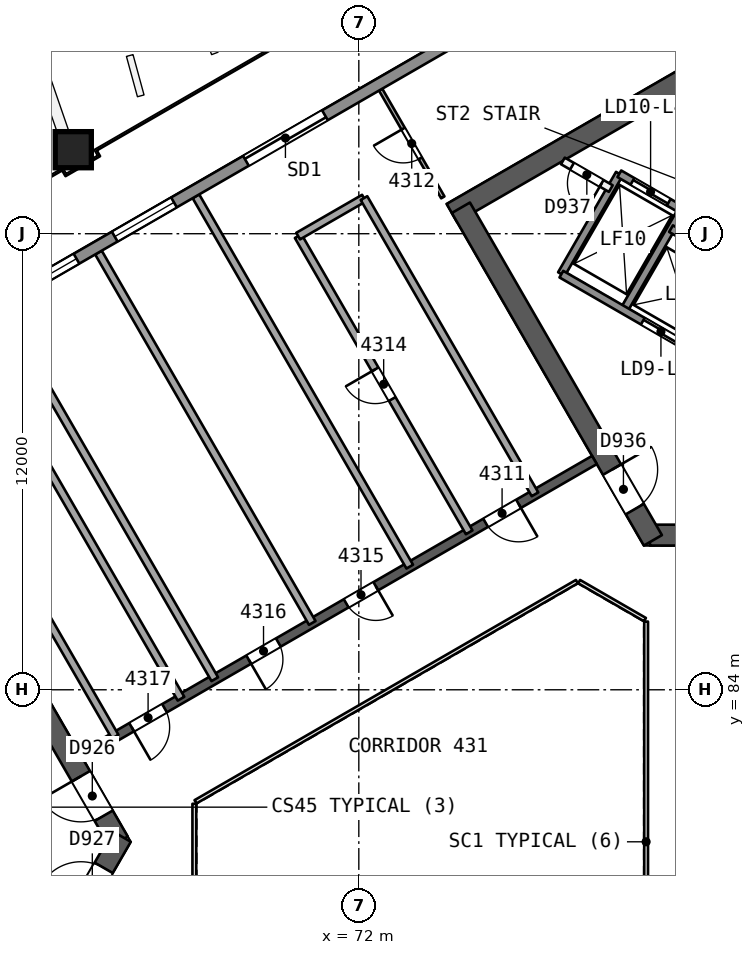
"""IFC4 building model, lengths in metres.
Left out: names, types, materials, properties, quantities, classifications, styles, units other than length and angle.
Written with IfcOpenShell. Run it as: python <this file> out.ifc"""

import sys

from ifc_helpers import new_model, si_unit, direction, frame, frame_2d, origin, origin_2d, place, context, subcontext, project, spatial, rectangle, extrude, element, fill, save


model = new_model("IFC4")
c1 = context("Model", 3, precision=1e-05, world=origin(), true_north=direction((0.0, 1.0)))
c2 = subcontext(c1, "Body", "Model", "MODEL_VIEW")
j1 = project(units=[si_unit("LENGTHUNIT", "METRE"), si_unit("PLANEANGLEUNIT", "RADIAN")], contexts=[c1])
p1 = place(None, origin())
s1 = spatial("IfcSite", under=j1, at=p1, CompositionType="ELEMENT")
p2 = place(p1, origin())
s2 = spatial("IfcBuilding", under=s1, at=p2, CompositionType="ELEMENT")
p3 = place(p2, frame((0.0, 0.0, 178.5)))
s3 = spatial("IfcBuildingStorey", under=s2, at=p3, CompositionType="ELEMENT", Elevation=178.5)
p4 = place(p3, frame((65.682, 80.0, 0.0), z_axis=(0.0, 0.0, 1.0), x_axis=(-0.500000202252, 0.866025287014, 0.0)))
e1 = element("IfcWall", 1, at=p4, inside=s3, PredefinedType="SHEAR", context=c2, shape_type="SweptSolid", body=[
    extrude(rectangle(XDim=10.221, YDim=0.55, at=frame_2d((5.111, 0.0))), origin(), (0.0, 0.0, 1.0), 3.7),
])
p5 = place(p4, frame((0.791, 0.0, 0.0)))
e2 = element("IfcOpeningElement", 2, at=p5, cuts=e1, PredefinedType="OPENING", context=c2, shape_type="SweptSolid", body=[
    extrude(rectangle(XDim=1.2, YDim=2.1, at=frame_2d((0.6, 1.05))), frame((0.0, 0.286, 0.0), z_axis=(0.0, -1.0, 0.0), x_axis=(1.0, 0.0, 0.0)), (0.0, 0.0, 1.0), 0.571),
])
p6 = place(p3, frame((60.709, 71.386, 0.0), z_axis=(0.0, 0.0, 1.0), x_axis=(0.500015938302, 0.866016201606, 0.0)))
e3 = element("IfcWall", 3, at=p6, inside=s3, PredefinedType="SHEAR", context=c2, shape_type="SweptSolid", body=[
    extrude(rectangle(XDim=10.105, YDim=0.55, at=frame_2d((5.053, 0.0))), origin(), (0.0, 0.0, 1.0), 3.7),
])
p7 = place(p6, frame((7.955, 0.0, 0.0)))
e4 = element("IfcOpeningElement", 4, at=p7, cuts=e3, PredefinedType="OPENING", context=c2, shape_type="SweptSolid", body=[
    extrude(rectangle(XDim=1.2, YDim=2.1, at=frame_2d((0.6, 1.05))), frame((0.0, 0.286, 0.0), z_axis=(0.0, -1.0, 0.0), x_axis=(1.0, 0.0, 0.0)), (0.0, 0.0, 1.0), 0.571),
])
p8 = place(p3, frame((79.659, 88.069, 0.0), z_axis=(0.0, 0.0, 1.0), x_axis=(1.0, 0.0, 0.0)))
e5 = element("IfcWall", 5, at=p8, inside=s3, PredefinedType="SHEAR", context=c2, shape_type="SweptSolid", body=[
    extrude(rectangle(XDim=10.221, YDim=0.55, at=frame_2d((5.111, 0.0))), origin(), (0.0, 0.0, 1.0), 3.7),
])
p9 = place(p8, frame((0.791, 0.0, 0.0)))
e6 = element("IfcOpeningElement", 6, at=p9, cuts=e5, PredefinedType="OPENING", context=c2, shape_type="SweptSolid", body=[
    extrude(rectangle(XDim=1.2, YDim=2.1, at=frame_2d((0.6, 1.05))), frame((0.0, 0.286, 0.0), z_axis=(0.0, -1.0, 0.0), x_axis=(1.0, 0.0, 0.0)), (0.0, 0.0, 1.0), 0.571),
])
p10 = place(p3, frame((86.723, 103.633, 0.0), z_axis=(0.0, 0.0, 1.0), x_axis=(-0.866023530946, -0.500003243837, 0.0)))
e7 = element("IfcWall", 7, at=p10, inside=s3, PredefinedType="SHEAR", context=c2, shape_type="SweptSolid", body=[
    extrude(rectangle(XDim=14.175, YDim=0.55, at=frame_2d((7.087, 0.0))), origin(), (0.0, 0.0, 1.0), 3.7),
])
p11 = place(p3, frame((74.686, 96.683, 0.0), z_axis=(0.0, 0.0, 1.0), x_axis=(0.499997818338, -0.866026663364, 0.0)))
e8 = element("IfcWall", 8, at=p11, inside=s3, PredefinedType="SHEAR", context=c2, shape_type="SweptSolid", body=[
    extrude(rectangle(XDim=10.105, YDim=0.55, at=frame_2d((5.052, 0.0))), origin(), (0.0, 0.0, 1.0), 3.7),
])
p12 = place(p11, frame((7.955, 0.0, 0.0)))
e9 = element("IfcOpeningElement", 9, at=p12, cuts=e8, PredefinedType="OPENING", context=c2, shape_type="SweptSolid", body=[
    extrude(rectangle(XDim=1.2, YDim=2.1, at=frame_2d((0.6, 1.05))), frame((0.0, 0.286, 0.0), z_axis=(0.0, -1.0, 0.0), x_axis=(1.0, 0.0, 0.0)), (0.0, 0.0, 1.0), 0.571),
])
p13 = place(p3, frame((78.2, 90.046, 0.0), z_axis=(0.0, 0.0, 1.0), x_axis=(-0.866026492143, -0.499998114903, 0.0)))
e10 = element("IfcWall", 10, at=p13, inside=s3, PredefinedType="SHEAR", context=c2, shape_type="SweptSolid", body=[
    extrude(rectangle(XDim=15.588, YDim=0.25, at=frame_2d((7.794, 0.0))), origin(), (0.0, 0.0, 1.0), 3.25),
])
p14 = place(p13, frame((2.306, 0.0, 0.0)))
e11 = element("IfcOpeningElement", 11, at=p14, cuts=e10, PredefinedType="OPENING", context=c2, shape_type="SweptSolid", body=[
    extrude(rectangle(XDim=1.0, YDim=2.1, at=frame_2d((0.5, 1.05))), frame((0.0, 0.135, 0.0), z_axis=(0.0, -1.0, 0.0), x_axis=(1.0, 0.0, 0.0)), (0.0, 0.0, 1.0), 0.271),
])
p15 = place(p13, frame((6.643, 0.0, 0.0)))
e12 = element("IfcOpeningElement", 12, at=p15, cuts=e10, PredefinedType="OPENING", context=c2, shape_type="SweptSolid", body=[
    extrude(rectangle(XDim=0.9, YDim=2.1, at=frame_2d((0.45, 1.05))), frame((0.0, 0.135, 0.0), z_axis=(0.0, -1.0, 0.0), x_axis=(1.0, 0.0, 0.0)), (0.0, 0.0, 1.0), 0.271),
])
p16 = place(p13, frame((9.604, 0.0, 0.0)))
e13 = element("IfcOpeningElement", 13, at=p16, cuts=e10, PredefinedType="OPENING", context=c2, shape_type="SweptSolid", body=[
    extrude(rectangle(XDim=0.9, YDim=2.1, at=frame_2d((0.45, 1.05))), frame((0.0, 0.135, 0.0), z_axis=(0.0, -1.0, 0.0), x_axis=(1.0, 0.0, 0.0)), (0.0, 0.0, 1.0), 0.271),
])
p17 = place(p13, frame((13.062, 0.0, 0.0)))
e14 = element("IfcOpeningElement", 14, at=p17, cuts=e10, PredefinedType="OPENING", context=c2, shape_type="SweptSolid", body=[
    extrude(rectangle(XDim=1.0, YDim=2.1, at=frame_2d((0.5, 1.05))), frame((0.0, 0.135, 0.0), z_axis=(0.0, -1.0, 0.0), x_axis=(1.0, 0.0, 0.0)), (0.0, 0.0, 1.0), 0.271),
])
p18 = place(p3, frame((64.474, 98.231, 0.0), z_axis=(0.010093620709, -0.017482414954, 0.999796221231), x_axis=(-0.499897086036, 0.865849517735, 0.020187025824)))
e15 = element("IfcColumn", 15, at=p18, inside=s3, PredefinedType="COLUMN", context=c2, shape_type="SweptSolid", body=[
    extrude(rectangle(XDim=0.95, YDim=0.95, at=origin_2d()), origin(), (0.0, 0.0, 1.0), 3.701),
])
p19 = place(p3, frame((74.21, 96.956, 0.0), z_axis=(0.0, 0.0, 1.0), x_axis=(-0.499980647919, 0.866036576425, 0.0)))
e16 = element("IfcWall", 16, at=p19, inside=s3, PredefinedType="PARTITIONING", context=c2, shape_type="SweptSolid", body=[
    extrude(rectangle(XDim=3.274, YDim=0.1, at=frame_2d((1.637, 0.0))), origin(), (0.0, 0.0, 1.0), 3.25),
])
p20 = place(p19, frame((1.187, 0.0, 0.0)))
e17 = element("IfcOpeningElement", 17, at=p20, cuts=e16, PredefinedType="OPENING", context=c2, shape_type="SweptSolid", body=[
    extrude(rectangle(XDim=0.9, YDim=2.1, at=frame_2d((0.45, 1.05))), frame((0.0, 0.061, 0.0), z_axis=(0.0, -1.0, 0.0), x_axis=(1.0, 0.0, 0.0)), (0.0, 0.0, 1.0), 0.121),
])
p21 = place(p3, frame((74.904, 88.143, 0.0), z_axis=(0.0, 0.0, 1.0), x_axis=(-0.499990139034, 0.866031096941, 0.0)))
e18 = element("IfcWall", 18, at=p21, inside=s3, PredefinedType="PARTITIONING", context=c2, shape_type="SweptSolid", body=[
    extrude(rectangle(XDim=9.0, YDim=0.2, at=frame_2d((4.5, 0.0))), origin(), (0.0, 0.0, 1.0), 3.25),
])
p22 = place(p21, frame((4.05, 0.0, 0.0)))
e19 = element("IfcOpeningElement", 19, at=p22, cuts=e18, PredefinedType="OPENING", context=c2, shape_type="SweptSolid", body=[
    extrude(rectangle(XDim=0.9, YDim=2.1, at=frame_2d((0.45, 1.05))), frame((0.0, 0.11, 0.0), z_axis=(0.0, -1.0, 0.0), x_axis=(1.0, 0.0, 0.0)), (0.0, 0.0, 1.0), 0.221),
])
p23 = place(p3, frame((70.404, 95.937, 0.0), z_axis=(0.0, 0.0, 1.0), x_axis=(0.866010750942, 0.50002537861, 0.0)))
e20 = element("IfcWall", 20, at=p23, inside=s3, PredefinedType="PARTITIONING", context=c2, shape_type="SweptSolid", body=[
    extrude(rectangle(XDim=2.0, YDim=0.2, at=frame_2d((1.0, 0.0))), origin(), (0.0, 0.0, 1.0), 3.25),
])
p24 = place(p3, frame((72.136, 96.937, 0.0), z_axis=(0.0, 0.0, 1.0), x_axis=(0.499990139034, -0.866031096941, 0.0)))
e21 = element("IfcWall", 21, at=p24, inside=s3, PredefinedType="PARTITIONING", context=c2, shape_type="SweptSolid", body=[
    extrude(rectangle(XDim=9.0, YDim=0.2, at=frame_2d((4.5, 0.0))), origin(), (0.0, 0.0, 1.0), 3.25),
])
for number, where, z_axis, x_axis in (
    (22, (67.714, 96.985, 0.0), (0.0, 0.0, 1.0), (0.5, -0.866, 0.0)),
    (23, (65.148, 95.504, 0.0), (0.0, 0.0, 1.0), (0.5, -0.866, 0.0)),
    (24, (62.583, 94.023, 0.0), (0.0, 0.0, 1.0), (0.5, -0.866, 0.0)),
):
    element("IfcWall", number, at=place(p3, frame(where, z_axis=z_axis, x_axis=x_axis)), inside=s3, PredefinedType="PARTITIONING", context=c2, shape_type="SweptSolid", body=[
        extrude(rectangle(XDim=11.253, YDim=0.2, at=frame_2d((5.626, 0.0))), origin(), (0.0, 0.0, 1.0), 3.25),
    ])
for number, where, z_axis, x_axis in (
    (25, (65.589, 82.765, 0.0), (0.0, 0.0, 1.0), (-0.5, 0.866, 0.0)),
    (26, (62.821, 91.559, 0.0), (0.0, 0.0, 1.0), (0.5, -0.866, 0.0)),
):
    element("IfcWall", number, at=place(p3, frame(where, z_axis=z_axis, x_axis=x_axis)), inside=s3, PredefinedType="PARTITIONING", context=c2, shape_type="SweptSolid", body=[
        extrude(rectangle(XDim=9.0, YDim=0.2, at=frame_2d((4.5, 0.0))), origin(), (0.0, 0.0, 1.0), 3.25),
    ])
p25 = place(p3, frame((42.71, 82.722, 0.0), z_axis=(0.0, 0.0, 1.0), x_axis=(0.866026647012, 0.499997846661, 0.0)))
e27 = element("IfcWall", 27, at=p25, inside=s3, PredefinedType="SOLIDWALL", context=c2, shape_type="SweptSolid", body=[
    extrude(rectangle(XDim=53.206, YDim=0.3, at=frame_2d((26.603, 0.0))), origin(), (0.0, 0.0, 1.0), 3.25),
])
p26 = place(p25, frame((30.391, 0.0, 0.0)))
e28 = element("IfcOpeningElement", 28, at=p26, cuts=e27, PredefinedType="OPENING", context=c2, shape_type="SweptSolid", body=[
    extrude(rectangle(XDim=2.4, YDim=2.4, at=frame_2d((1.2, 1.2))), frame((0.0, 0.161, 0.0), z_axis=(0.0, -1.0, 0.0), x_axis=(1.0, 0.0, 0.0)), (0.0, 0.0, 1.0), 0.321),
])
p27 = place(p25, frame((41.356, 0.0, 0.0)))
e29 = element("IfcOpeningElement", 29, at=p27, cuts=e27, PredefinedType="OPENING", context=c2, shape_type="SweptSolid", body=[
    extrude(rectangle(XDim=2.4, YDim=2.4, at=frame_2d((1.2, 1.2))), frame((0.0, 0.161, 0.0), z_axis=(0.0, -1.0, 0.0), x_axis=(1.0, 0.0, 0.0)), (0.0, 0.0, 1.0), 0.321),
])
p28 = place(p25, frame((19.635, 0.0, 0.0)))
e30 = element("IfcOpeningElement", 30, at=p28, cuts=e27, PredefinedType="OPENING", context=c2, shape_type="SweptSolid", body=[
    extrude(rectangle(XDim=2.4, YDim=2.4, at=frame_2d((1.2, 1.2))), frame((0.0, 0.161, 0.0), z_axis=(0.0, -1.0, 0.0), x_axis=(1.0, 0.0, 0.0)), (0.0, 0.0, 1.0), 0.321),
])
p29 = place(p25, frame((9.4, 0.0, 0.0)))
e31 = element("IfcOpeningElement", 31, at=p29, cuts=e27, PredefinedType="OPENING", context=c2, shape_type="SweptSolid", body=[
    extrude(rectangle(XDim=2.4, YDim=2.4, at=frame_2d((1.2, 1.2))), frame((0.0, 0.161, 0.0), z_axis=(0.0, -1.0, 0.0), x_axis=(1.0, 0.0, 0.0)), (0.0, 0.0, 1.0), 0.321),
])
p30 = place(p25, frame((26.404, 0.0, 0.9)))
e32 = element("IfcOpeningElement", 32, at=p30, cuts=e27, PredefinedType="OPENING", context=c2, shape_type="SweptSolid", body=[
    extrude(rectangle(XDim=1.8, YDim=1.5, at=frame_2d((0.9, 0.75))), frame((0.0, 0.161, 0.0), z_axis=(0.0, -1.0, 0.0), x_axis=(1.0, 0.0, 0.0)), (0.0, 0.0, 1.0), 0.321),
])
p31 = place(p25, frame((23.442, 0.0, 0.9)))
e33 = element("IfcOpeningElement", 33, at=p31, cuts=e27, PredefinedType="OPENING", context=c2, shape_type="SweptSolid", body=[
    extrude(rectangle(XDim=1.8, YDim=1.5, at=frame_2d((0.9, 0.75))), frame((0.0, 0.161, 0.0), z_axis=(0.0, -1.0, 0.0), x_axis=(1.0, 0.0, 0.0)), (0.0, 0.0, 1.0), 0.321),
])
for number, where, z_axis, x_axis in (
    (34, (78.976, 93.986, 0.0), (0.0, 0.0, 1.0), (0.5, 0.866, 0.0)),
    (35, (77.33, 94.936, 0.0), (0.0, 0.0, 1.0), (0.5, 0.866, 0.0)),
):
    element("IfcWall", number, at=place(p3, frame(where, z_axis=z_axis, x_axis=x_axis)), inside=s3, PredefinedType="SOLIDWALL", context=c2, shape_type="SweptSolid", body=[
        extrude(rectangle(XDim=3.05, YDim=0.2, at=frame_2d((1.525, 0.0))), origin(), (0.0, 0.0, 1.0), 3.25),
    ])
p32 = place(p3, frame((86.77, 89.486, 0.0), z_axis=(0.0, 0.0, 1.0), x_axis=(-0.86601811187, 0.500012629753, 0.0)))
e36 = element("IfcWall", 36, at=p32, inside=s3, PredefinedType="SOLIDWALL", context=c2, shape_type="SweptSolid", body=[
    extrude(rectangle(XDim=10.9, YDim=0.2, at=frame_2d((5.45, 0.0))), origin(), (0.0, 0.0, 1.0), 3.25),
])
p33 = place(p32, frame((0.575, 0.0, 0.0)))
e37 = element("IfcOpeningElement", 37, at=p33, cuts=e36, PredefinedType="OPENING", context=c2, shape_type="SweptSolid", body=[
    extrude(rectangle(XDim=1.1, YDim=2.1, at=frame_2d((0.55, 1.05))), frame((0.0, 0.11, 0.0), z_axis=(0.0, -1.0, 0.0), x_axis=(1.0, 0.0, 0.0)), (0.0, 0.0, 1.0), 0.221),
])
p34 = place(p32, frame((2.825, 0.0, 0.0)))
e38 = element("IfcOpeningElement", 38, at=p34, cuts=e36, PredefinedType="OPENING", context=c2, shape_type="SweptSolid", body=[
    extrude(rectangle(XDim=1.1, YDim=2.1, at=frame_2d((0.55, 1.05))), frame((0.0, 0.11, 0.0), z_axis=(0.0, -1.0, 0.0), x_axis=(1.0, 0.0, 0.0)), (0.0, 0.0, 1.0), 0.221),
])
p35 = place(p32, frame((5.075, 0.0, 0.0)))
e39 = element("IfcOpeningElement", 39, at=p35, cuts=e36, PredefinedType="OPENING", context=c2, shape_type="SweptSolid", body=[
    extrude(rectangle(XDim=1.1, YDim=2.1, at=frame_2d((0.55, 1.05))), frame((0.0, 0.11, 0.0), z_axis=(0.0, -1.0, 0.0), x_axis=(1.0, 0.0, 0.0)), (0.0, 0.0, 1.0), 0.221),
])
p36 = place(p32, frame((7.325, 0.0, 0.0)))
e40 = element("IfcOpeningElement", 40, at=p36, cuts=e36, PredefinedType="OPENING", context=c2, shape_type="SweptSolid", body=[
    extrude(rectangle(XDim=1.1, YDim=2.1, at=frame_2d((0.55, 1.05))), frame((0.0, 0.11, 0.0), z_axis=(0.0, -1.0, 0.0), x_axis=(1.0, 0.0, 0.0)), (0.0, 0.0, 1.0), 0.221),
])
p37 = place(p3, frame((89.33, 90.872, 0.0), z_axis=(0.0, 0.0, 1.0), x_axis=(-0.866027589512, 0.49999621419, 0.0)))
e41 = element("IfcWall", 41, at=p37, inside=s3, PredefinedType="SOLIDWALL", context=c2, shape_type="SweptSolid", body=[
    extrude(rectangle(XDim=10.524, YDim=0.2, at=frame_2d((5.262, 0.0))), origin(), (0.0, 0.0, 1.0), 3.25),
])
p38 = place(p37, frame((0.312, 0.0, 0.0)))
e42 = element("IfcOpeningElement", 42, at=p38, cuts=e41, PredefinedType="OPENING", context=c2, shape_type="SweptSolid", body=[
    extrude(rectangle(XDim=0.9, YDim=2.1, at=frame_2d((0.45, 1.05))), frame((0.0, 0.11, 0.0), z_axis=(0.0, -1.0, 0.0), x_axis=(1.0, 0.0, 0.0)), (0.0, 0.0, 1.0), 0.221),
])
p39 = place(p3, frame((78.63, 97.188, 0.0), z_axis=(0.0, 0.0, 1.0), x_axis=(-0.866003949776, 0.500037157592, 0.0)))
e43 = element("IfcWall", 43, at=p39, inside=s3, PredefinedType="PARTITIONING", context=c2, shape_type="SweptSolid", body=[
    extrude(rectangle(XDim=1.455, YDim=0.2, at=frame_2d((0.728, 0.0))), origin(), (0.0, 0.0, 1.0), 3.25),
])
p40 = place(p39, frame((0.278, 0.0, 0.0)))
e44 = element("IfcOpeningElement", 44, at=p40, cuts=e43, PredefinedType="OPENING", context=c2, shape_type="SweptSolid", body=[
    extrude(rectangle(XDim=0.9, YDim=2.1, at=frame_2d((0.45, 1.05))), frame((0.0, 0.11, 0.0), z_axis=(0.0, -1.0, 0.0), x_axis=(1.0, 0.0, 0.0)), (0.0, 0.0, 1.0), 0.221),
])
p41 = place(p3, frame((80.5, 96.627, 0.0), z_axis=(0.0, 0.0, 1.0), x_axis=(-0.86601224135, 0.500022797313, 0.0)))
e45 = element("IfcWall", 45, at=p41, inside=s3, PredefinedType="SOLIDWALL", context=c2, shape_type="SweptSolid", body=[
    extrude(rectangle(XDim=1.9, YDim=0.2, at=frame_2d((0.95, 0.0))), origin(), (0.0, 0.0, 1.0), 3.25),
])
p42 = place(p41, frame((0.4, 0.0, 0.0)))
e46 = element("IfcOpeningElement", 46, at=p42, cuts=e45, PredefinedType="OPENING", context=c2, shape_type="SweptSolid", body=[
    extrude(rectangle(XDim=1.1, YDim=2.1, at=frame_2d((0.55, 1.05))), frame((0.0, 0.11, 0.0), z_axis=(0.0, -1.0, 0.0), x_axis=(1.0, 0.0, 0.0)), (0.0, 0.0, 1.0), 0.221),
])
p43 = place(p3, frame((79.56, 74.206, 0.0), z_axis=(0.0, 0.0, 1.0), x_axis=(0.0, 1.0, 0.0)))
e47 = element("IfcWall", 47, at=p43, inside=s3, PredefinedType="PARTITIONING", context=c2, shape_type="SweptSolid", body=[
    extrude(rectangle(XDim=11.588, YDim=0.1, at=frame_2d((5.794, 0.0))), origin(), (0.0, 0.0, 1.0), 3.25),
])
p44 = place(p3, frame((79.53, 85.846, 0.0), z_axis=(0.0, 0.0, 1.0), x_axis=(-0.866041268327, 0.499972520799, 0.0)))
e48 = element("IfcWall", 48, at=p44, inside=s3, PredefinedType="PARTITIONING", context=c2, shape_type="SweptSolid", body=[
    extrude(rectangle(XDim=2.0, YDim=0.1, at=frame_2d((1.0, 0.0))), origin(), (0.0, 0.0, 1.0), 3.25),
])
p45 = place(p3, frame((77.738, 86.846, 0.0), z_axis=(0.0, 0.0, 1.0), x_axis=(-0.866026658274, -0.499997827154, 0.0)))
e49 = element("IfcWall", 49, at=p45, inside=s3, PredefinedType="PARTITIONING", context=c2, shape_type="SweptSolid", body=[
    extrude(rectangle(XDim=11.588, YDim=0.1, at=frame_2d((5.794, 0.0))), origin(), (0.0, 0.0, 1.0), 3.25),
])
p46 = place(p3, frame((67.672, 81.0, 0.0), z_axis=(0.0, 0.0, 1.0), x_axis=(0.0, -1.0, 0.0)))
e50 = element("IfcWall", 50, at=p46, inside=s3, PredefinedType="PARTITIONING", context=c2, shape_type="SweptSolid", body=[
    extrude(rectangle(XDim=2.0, YDim=0.1, at=frame_2d((1.0, 0.0))), origin(), (0.0, 0.0, 1.0), 3.25),
])
p47 = place(p14, origin())
e51 = element("IfcDoor", 51, at=p47, inside=s3, OperationType="SINGLE_SWING_LEFT", PredefinedType="NOTDEFINED", context=c2, shape_type="SweptSolid", body=[
    extrude(rectangle(XDim=1.0, YDim=2.1, at=frame_2d((0.5, 1.05))), frame((0.0, 0.025, 0.0), z_axis=(0.0, -1.0, 0.0), x_axis=(1.0, 0.0, 0.0)), (0.0, 0.0, 1.0), 0.05),
])
fill(e11, e51)
p48 = place(p20, origin())
e52 = element("IfcDoor", 52, at=p48, inside=s3, OperationType="SINGLE_SWING_RIGHT", PredefinedType="NOTDEFINED", context=c2, shape_type="SweptSolid", body=[
    extrude(rectangle(XDim=0.9, YDim=2.1, at=frame_2d((0.45, 1.05))), frame((0.0, 0.025, 0.0), z_axis=(0.0, -1.0, 0.0), x_axis=(1.0, 0.0, 0.0)), (0.0, 0.0, 1.0), 0.05),
])
fill(e17, e52)
p49 = place(p22, origin())
e53 = element("IfcDoor", 53, at=p49, inside=s3, OperationType="SINGLE_SWING_RIGHT", PredefinedType="NOTDEFINED", context=c2, shape_type="SweptSolid", body=[
    extrude(rectangle(XDim=0.9, YDim=2.1, at=frame_2d((0.45, 1.05))), frame((0.0, 0.025, 0.0), z_axis=(0.0, -1.0, 0.0), x_axis=(1.0, 0.0, 0.0)), (0.0, 0.0, 1.0), 0.05),
])
fill(e19, e53)
p50 = place(p15, origin())
e54 = element("IfcDoor", 54, at=p50, inside=s3, OperationType="SINGLE_SWING_LEFT", PredefinedType="NOTDEFINED", context=c2, shape_type="SweptSolid", body=[
    extrude(rectangle(XDim=0.9, YDim=2.1, at=frame_2d((0.45, 1.05))), frame((0.0, 0.025, 0.0), z_axis=(0.0, -1.0, 0.0), x_axis=(1.0, 0.0, 0.0)), (0.0, 0.0, 1.0), 0.05),
])
fill(e12, e54)
p51 = place(p16, origin())
e55 = element("IfcDoor", 55, at=p51, inside=s3, OperationType="SINGLE_SWING_RIGHT", PredefinedType="NOTDEFINED", context=c2, shape_type="SweptSolid", body=[
    extrude(rectangle(XDim=0.9, YDim=2.1, at=frame_2d((0.45, 1.05))), frame((0.0, 0.025, 0.0), z_axis=(0.0, -1.0, 0.0), x_axis=(1.0, 0.0, 0.0)), (0.0, 0.0, 1.0), 0.05),
])
fill(e13, e55)
p52 = place(p17, origin())
e56 = element("IfcDoor", 56, at=p52, inside=s3, OperationType="SINGLE_SWING_RIGHT", PredefinedType="NOTDEFINED", context=c2, shape_type="SweptSolid", body=[
    extrude(rectangle(XDim=1.0, YDim=2.1, at=frame_2d((0.5, 1.05))), frame((0.0, 0.025, 0.0), z_axis=(0.0, -1.0, 0.0), x_axis=(1.0, 0.0, 0.0)), (0.0, 0.0, 1.0), 0.05),
])
fill(e14, e56)
p53 = place(p26, origin())
e57 = element("IfcDoor", 57, at=p53, inside=s3, OperationType="SLIDING_TO_LEFT", PredefinedType="NOTDEFINED", context=c2, shape_type="SweptSolid", body=[
    extrude(rectangle(XDim=2.4, YDim=2.4, at=frame_2d((1.2, 1.2))), frame((0.0, 0.025, 0.0), z_axis=(0.0, -1.0, 0.0), x_axis=(1.0, 0.0, 0.0)), (0.0, 0.0, 1.0), 0.05),
])
fill(e28, e57)
p54 = place(p30, origin())
e58 = element("IfcWindow", 58, at=p54, inside=s3, PartitioningType="SINGLE_PANEL", PredefinedType="WINDOW", context=c2, shape_type="SweptSolid", body=[
    extrude(rectangle(XDim=1.8, YDim=1.5, at=frame_2d((0.9, 0.75))), frame((0.0, 0.03, 0.0), z_axis=(0.0, -1.0, 0.0), x_axis=(1.0, 0.0, 0.0)), (0.0, 0.0, 1.0), 0.06),
])
fill(e32, e58)
p55 = place(p31, origin())
e59 = element("IfcWindow", 59, at=p55, inside=s3, PartitioningType="SINGLE_PANEL", PredefinedType="WINDOW", context=c2, shape_type="SweptSolid", body=[
    extrude(rectangle(XDim=1.8, YDim=1.5, at=frame_2d((0.9, 0.75))), frame((0.0, 0.03, 0.0), z_axis=(0.0, -1.0, 0.0), x_axis=(1.0, 0.0, 0.0)), (0.0, 0.0, 1.0), 0.06),
])
fill(e33, e59)
p56 = place(p5, origin())
e60 = element("IfcDoor", 60, at=p56, inside=s3, OperationType="SINGLE_SWING_RIGHT", PredefinedType="NOTDEFINED", context=c2, shape_type="SweptSolid", body=[
    extrude(rectangle(XDim=1.2, YDim=2.1, at=frame_2d((0.6, 1.05))), frame((0.0, 0.025, 0.0), z_axis=(0.0, -1.0, 0.0), x_axis=(1.0, 0.0, 0.0)), (0.0, 0.0, 1.0), 0.05),
])
fill(e2, e60)
p57 = place(p7, origin())
e61 = element("IfcDoor", 61, at=p57, inside=s3, OperationType="SINGLE_SWING_LEFT", PredefinedType="NOTDEFINED", context=c2, shape_type="SweptSolid", body=[
    extrude(rectangle(XDim=1.2, YDim=2.1, at=frame_2d((0.6, 1.05))), frame((0.0, 0.025, 0.0), z_axis=(0.0, -1.0, 0.0), x_axis=(1.0, 0.0, 0.0)), (0.0, 0.0, 1.0), 0.05),
])
fill(e4, e61)
p58 = place(p12, origin())
e62 = element("IfcDoor", 62, at=p58, inside=s3, OperationType="SINGLE_SWING_LEFT", PredefinedType="NOTDEFINED", context=c2, shape_type="SweptSolid", body=[
    extrude(rectangle(XDim=1.2, YDim=2.1, at=frame_2d((0.6, 1.05))), frame((0.0, 0.025, 0.0), z_axis=(0.0, -1.0, 0.0), x_axis=(1.0, 0.0, 0.0)), (0.0, 0.0, 1.0), 0.05),
])
fill(e9, e62)
p59 = place(p36, origin())
e63 = element("IfcDoor", 63, at=p59, inside=s3, OperationType="SLIDING_TO_LEFT", PredefinedType="NOTDEFINED", context=c2, shape_type="SweptSolid", body=[
    extrude(rectangle(XDim=1.1, YDim=2.1, at=frame_2d((0.55, 1.05))), frame((0.0, 0.025, 0.0), z_axis=(0.0, -1.0, 0.0), x_axis=(1.0, 0.0, 0.0)), (0.0, 0.0, 1.0), 0.05),
])
fill(e40, e63)
p60 = place(p42, origin())
e64 = element("IfcDoor", 64, at=p60, inside=s3, OperationType="SLIDING_TO_RIGHT", PredefinedType="NOTDEFINED", context=c2, shape_type="SweptSolid", body=[
    extrude(rectangle(XDim=1.1, YDim=2.1, at=frame_2d((0.55, 1.05))), frame((0.0, 0.025, 0.0), z_axis=(0.0, -1.0, 0.0), x_axis=(1.0, 0.0, 0.0)), (0.0, 0.0, 1.0), 0.05),
])
fill(e46, e64)
p61 = place(p40, origin())
e65 = element("IfcDoor", 65, at=p61, inside=s3, OperationType="SINGLE_SWING_LEFT", PredefinedType="NOTDEFINED", context=c2, shape_type="SweptSolid", body=[
    extrude(rectangle(XDim=0.9, YDim=2.1, at=frame_2d((0.45, 1.05))), frame((0.0, 0.025, 0.0), z_axis=(0.0, -1.0, 0.0), x_axis=(1.0, 0.0, 0.0)), (0.0, 0.0, 1.0), 0.05),
])
fill(e44, e65)
save(model, sys.argv[1])
